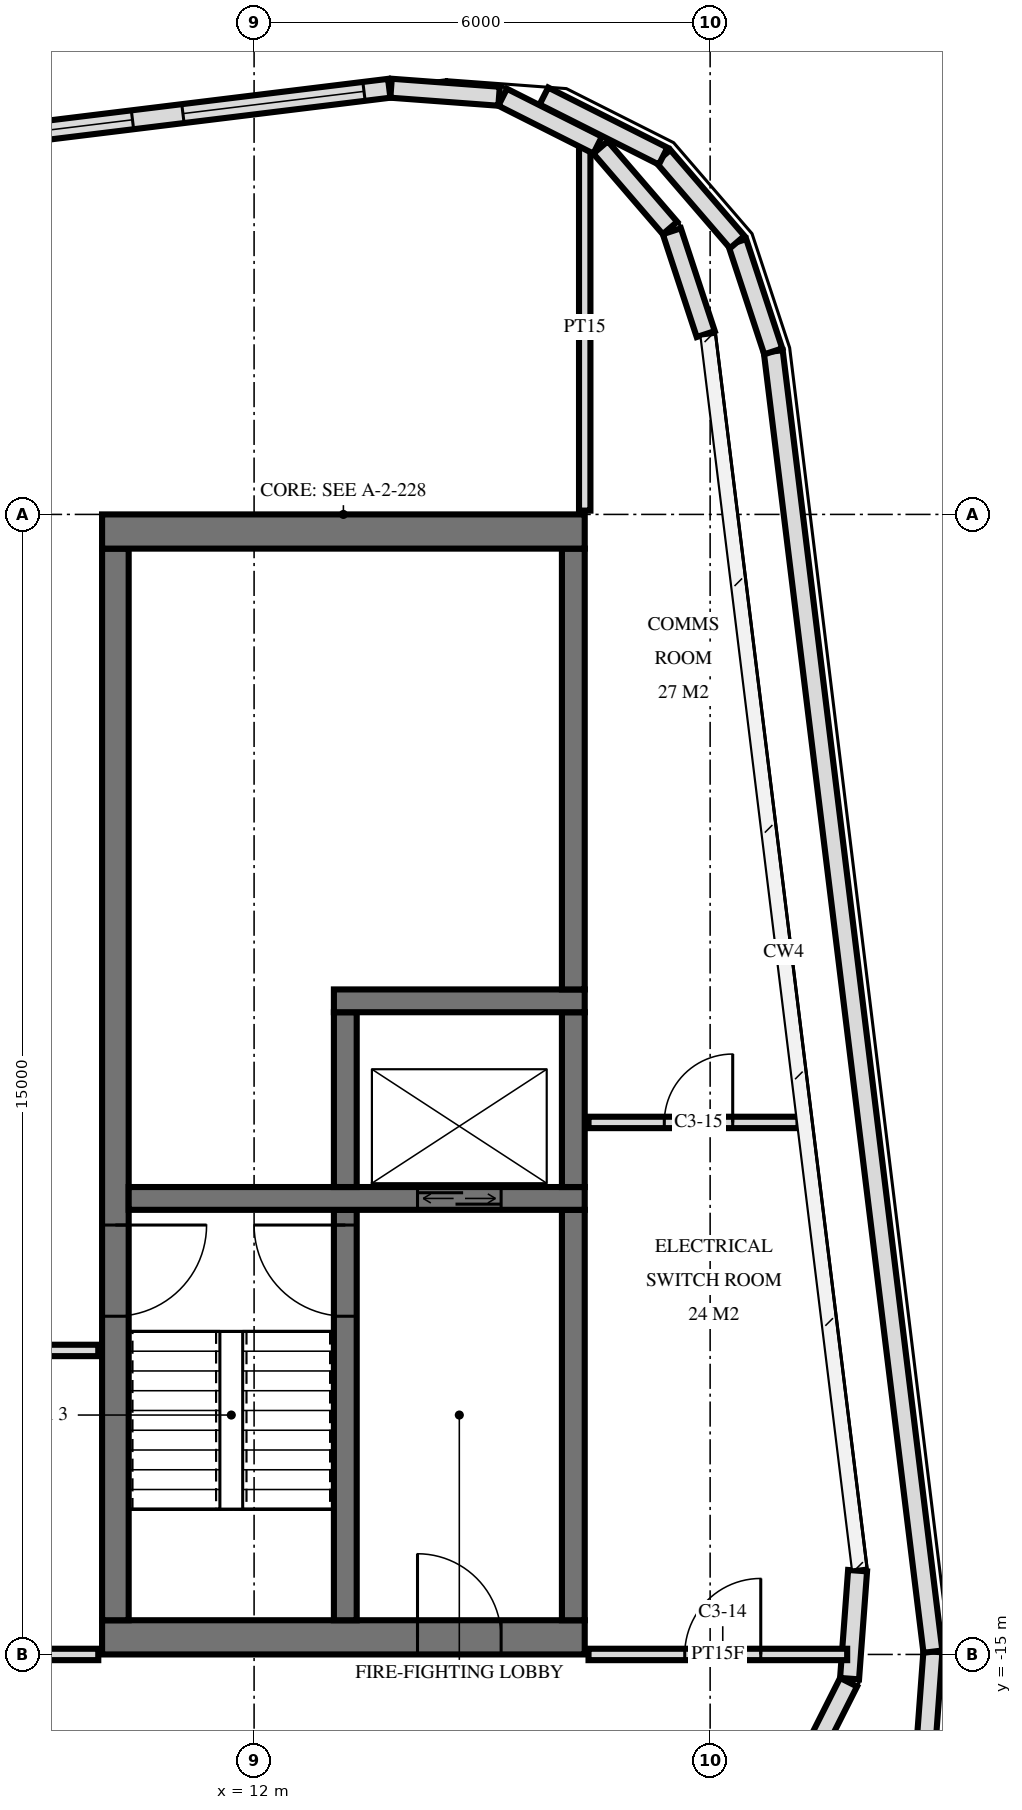
"""IFC4 building model, lengths in metres.
Left out: names, types, materials, properties, quantities, classifications, styles, units other than length and angle.
Written with IfcOpenShell. Run it as: python <this file> out.ifc"""

import sys

from ifc_helpers import new_model, si_unit, direction, frame, frame_2d, origin, place, context, subcontext, project, spatial, rectangle, extrude, element, fill, save


model = new_model("IFC4")
c1 = context("Model", 3, precision=1e-05, world=origin(), true_north=direction((0.0, 1.0)))
c2 = subcontext(c1, "Body", "Model", "MODEL_VIEW")
j1 = project(units=[si_unit("LENGTHUNIT", "METRE"), si_unit("PLANEANGLEUNIT", "RADIAN")], contexts=[c1])
p1 = place(None, origin())
s1 = spatial("IfcSite", under=j1, at=p1, CompositionType="ELEMENT")
p2 = place(p1, origin())
s2 = spatial("IfcBuilding", under=s1, at=p2, CompositionType="ELEMENT")
p3 = place(p2, frame((0.0, 0.0, 353.8)))
s3 = spatial("IfcBuildingStorey", under=s2, at=p3, CompositionType="ELEMENT", Elevation=353.8)
p4 = place(p3, frame((10.0, -0.225, 0.0), z_axis=(0.0, 0.0, 1.0), x_axis=(1.0, 0.0, 0.0)))
e1 = element("IfcWall", 1, at=p4, inside=s3, PredefinedType="SHEAR", context=c2, shape_type="SweptSolid", body=[
    extrude(rectangle(XDim=6.35, YDim=0.45, at=frame_2d((3.175, 0.0))), origin(), (0.0, 0.0, 1.0), 3.6),
])
p5 = place(p3, frame((10.0, -14.775, 0.0), z_axis=(0.0, 0.0, 1.0), x_axis=(1.0, 0.0, 0.0)))
e2 = element("IfcWall", 2, at=p5, inside=s3, PredefinedType="SHEAR", context=c2, shape_type="SweptSolid", body=[
    extrude(rectangle(XDim=6.35, YDim=0.45, at=frame_2d((3.175, 0.0))), origin(), (0.0, 0.0, 1.0), 3.6),
])
p6 = place(p5, frame((4.15, 0.0, 0.0)))
e3 = element("IfcOpeningElement", 3, at=p6, cuts=e2, PredefinedType="OPENING", context=c2, shape_type="SweptSolid", body=[
    extrude(rectangle(XDim=1.1, YDim=2.1, at=frame_2d((0.55, 1.05))), frame((0.0, 0.235, 0.0), z_axis=(0.0, -1.0, 0.0), x_axis=(1.0, 0.0, 0.0)), (0.0, 0.0, 1.0), 0.47),
])
p7 = place(p3, frame((10.175, -14.55, 0.0), z_axis=(0.0, 0.0, 1.0), x_axis=(0.0, 1.0, 0.0)))
e4 = element("IfcWall", 4, at=p7, inside=s3, PredefinedType="SHEAR", context=c2, shape_type="SweptSolid", body=[
    extrude(rectangle(XDim=14.1, YDim=0.35, at=frame_2d((7.05, 0.0))), origin(), (0.0, 0.0, 1.0), 3.6),
])
p8 = place(p7, frame((4.0, 0.0, 0.0)))
e5 = element("IfcOpeningElement", 5, at=p8, cuts=e4, PredefinedType="OPENING", context=c2, shape_type="SweptSolid", body=[
    extrude(rectangle(XDim=1.2, YDim=2.1, at=frame_2d((0.6, 1.05))), frame((0.0, 0.185, 0.0), z_axis=(0.0, -1.0, 0.0), x_axis=(1.0, 0.0, 0.0)), (0.0, 0.0, 1.0), 0.37),
])
p9 = place(p3, frame((16.2, -6.25, 0.0), z_axis=(0.0, 0.0, 1.0), x_axis=(0.0, 1.0, 0.0)))
e6 = element("IfcWall", 6, at=p9, inside=s3, PredefinedType="SHEAR", context=c2, shape_type="SweptSolid", body=[
    extrude(rectangle(XDim=5.8, YDim=0.3, at=frame_2d((2.9, 0.0))), origin(), (0.0, 0.0, 1.0), 3.6),
])
p10 = place(p3, frame((16.2, -14.55, 0.0), z_axis=(0.0, 0.0, 1.0), x_axis=(0.0, 1.0, 0.0)))
e7 = element("IfcWall", 7, at=p10, inside=s3, PredefinedType="SHEAR", context=c2, shape_type="SweptSolid", body=[
    extrude(rectangle(XDim=5.4, YDim=0.3, at=frame_2d((2.7, 0.0))), origin(), (0.0, 0.0, 1.0), 3.6),
])
p11 = place(p3, frame((10.35, -9.0, 0.0), z_axis=(0.0, 0.0, 1.0), x_axis=(1.0, 0.0, 0.0)))
e8 = element("IfcWall", 8, at=p11, inside=s3, PredefinedType="SHEAR", context=c2, shape_type="SweptSolid", body=[
    extrude(rectangle(XDim=6.0, YDim=0.3, at=frame_2d((3.0, 0.0))), origin(), (0.0, 0.0, 1.0), 3.6),
])
p12 = place(p11, frame((3.8, 0.0, 0.0)))
e9 = element("IfcOpeningElement", 9, at=p12, cuts=e8, PredefinedType="OPENING", context=c2, shape_type="SweptSolid", body=[
    extrude(rectangle(XDim=1.1, YDim=2.1, at=frame_2d((0.55, 1.05))), frame((0.0, 0.16, 0.0), z_axis=(0.0, -1.0, 0.0), x_axis=(1.0, 0.0, 0.0)), (0.0, 0.0, 1.0), 0.32),
])
p13 = place(p3, frame((13.2, -14.55, 0.0), z_axis=(0.0, 0.0, 1.0), x_axis=(0.0, 1.0, 0.0)))
e10 = element("IfcWall", 10, at=p13, inside=s3, PredefinedType="SHEAR", context=c2, shape_type="SweptSolid", body=[
    extrude(rectangle(XDim=5.4, YDim=0.3, at=frame_2d((2.7, 0.0))), origin(), (0.0, 0.0, 1.0), 3.6),
])
p14 = place(p13, frame((4.0, 0.0, 0.0)))
e11 = element("IfcOpeningElement", 11, at=p14, cuts=e10, PredefinedType="OPENING", context=c2, shape_type="SweptSolid", body=[
    extrude(rectangle(XDim=1.2, YDim=2.1, at=frame_2d((0.6, 1.05))), frame((0.0, 0.16, 0.0), z_axis=(0.0, -1.0, 0.0), x_axis=(1.0, 0.0, 0.0)), (0.0, 0.0, 1.0), 0.32),
])
p15 = place(p3, frame((13.05, -6.4, 0.0), z_axis=(0.0, 0.0, 1.0), x_axis=(1.0, 0.0, 0.0)))
e12 = element("IfcWall", 12, at=p15, inside=s3, PredefinedType="SHEAR", context=c2, shape_type="SweptSolid", body=[
    extrude(rectangle(XDim=3.3, YDim=0.3, at=frame_2d((1.65, 0.0))), origin(), (0.0, 0.0, 1.0), 3.6),
])
for number, where, z_axis, x_axis in (
    (13, (13.2, -8.85, 0.0), (0.0, 0.0, 1.0), (0.0, 1.0, 0.0)),
    (14, (16.2, -8.85, 0.0), (0.0, 0.0, 1.0), (0.0, 1.0, 0.0)),
):
    element("IfcWall", number, at=place(p3, frame(where, z_axis=z_axis, x_axis=x_axis)), inside=s3, PredefinedType="SHEAR", context=c2, shape_type="SweptSolid", body=[
        extrude(rectangle(XDim=2.3, YDim=0.3, at=frame_2d((1.15, 0.0))), origin(), (0.0, 0.0, 1.0), 3.6),
    ])
p16 = place(p3, frame((17.942, 2.373, 0.0), z_axis=(0.0, 0.0, 1.0), x_axis=(-0.313244554677, 0.949672495635, 0.0)))
e15 = element("IfcWall", 15, at=p16, inside=s3, PredefinedType="SOLIDWALL", context=c2, shape_type="SweptSolid", body=[
    extrude(rectangle(XDim=1.425, YDim=0.25, at=frame_2d((0.712, 0.0))), origin(), (0.0, 0.0, 1.0), 3.32),
])
p17 = place(p3, frame((17.472, 3.769, 0.0), z_axis=(0.0, 0.0, 1.0), x_axis=(-0.652742912325, 0.757579494449, 0.0)))
e16 = element("IfcWall", 16, at=p17, inside=s3, PredefinedType="SOLIDWALL", context=c2, shape_type="SweptSolid", body=[
    extrude(rectangle(XDim=1.4, YDim=0.25, at=frame_2d((0.7, 0.0))), origin(), (0.0, 0.0, 1.0), 3.32),
])
p18 = place(p3, frame((16.52, 4.859, 0.0), z_axis=(0.0, 0.0, 1.0), x_axis=(-0.892957383621, 0.450141212329, 0.0)))
e17 = element("IfcWall", 17, at=p18, inside=s3, PredefinedType="SOLIDWALL", context=c2, shape_type="SweptSolid", body=[
    extrude(rectangle(XDim=1.4, YDim=0.25, at=frame_2d((0.7, 0.0))), origin(), (0.0, 0.0, 1.0), 3.32),
])
p19 = place(p3, frame((15.223, 5.502, 0.0), z_axis=(0.0, 0.0, 1.0), x_axis=(-0.997256522221, 0.074023164536, 0.0)))
e18 = element("IfcWall", 18, at=p19, inside=s3, PredefinedType="SOLIDWALL", context=c2, shape_type="SweptSolid", body=[
    extrude(rectangle(XDim=1.425, YDim=0.25, at=frame_2d((0.712, 0.0))), origin(), (0.0, 0.0, 1.0), 3.32),
])
p20 = place(p3, frame((13.778, 5.607, 0.0), z_axis=(0.0, 0.0, 1.0), x_axis=(-0.992546967066, -0.121862702117, 0.0)))
e19 = element("IfcWall", 19, at=p20, inside=s3, PredefinedType="SOLIDWALL", context=c2, shape_type="SweptSolid", body=[
    extrude(rectangle(XDim=30.688, YDim=0.25, at=frame_2d((15.344, 0.0))), origin(), (0.0, 0.0, 1.0), 3.32),
])
p21 = place(p20, frame((0.334, 0.0, 0.498)))
e20 = element("IfcOpeningElement", 20, at=p21, cuts=e19, PredefinedType="OPENING", context=c2, shape_type="SweptSolid", body=[
    extrude(rectangle(XDim=2.4, YDim=2.622, at=frame_2d((1.2, 1.311))), frame((0.0, 0.135, 0.0), z_axis=(0.0, -1.0, 0.0), x_axis=(1.0, 0.0, 0.0)), (0.0, 0.0, 1.0), 0.27),
])
p22 = place(p20, frame((3.403, 0.0, 0.498)))
e21 = element("IfcOpeningElement", 21, at=p22, cuts=e19, PredefinedType="OPENING", context=c2, shape_type="SweptSolid", body=[
    extrude(rectangle(XDim=2.4, YDim=2.622, at=frame_2d((1.2, 1.311))), frame((0.0, 0.135, 0.0), z_axis=(0.0, -1.0, 0.0), x_axis=(1.0, 0.0, 0.0)), (0.0, 0.0, 1.0), 0.27),
])
p23 = place(p20, frame((6.472, 0.0, 0.498)))
e22 = element("IfcOpeningElement", 22, at=p23, cuts=e19, PredefinedType="OPENING", context=c2, shape_type="SweptSolid", body=[
    extrude(rectangle(XDim=2.4, YDim=2.622, at=frame_2d((1.2, 1.311))), frame((0.0, 0.135, 0.0), z_axis=(0.0, -1.0, 0.0), x_axis=(1.0, 0.0, 0.0)), (0.0, 0.0, 1.0), 0.27),
])
p24 = place(p20, frame((9.541, 0.0, 0.498)))
e23 = element("IfcOpeningElement", 23, at=p24, cuts=e19, PredefinedType="OPENING", context=c2, shape_type="SweptSolid", body=[
    extrude(rectangle(XDim=2.4, YDim=2.622, at=frame_2d((1.2, 1.311))), frame((0.0, 0.135, 0.0), z_axis=(0.0, -1.0, 0.0), x_axis=(1.0, 0.0, 0.0)), (0.0, 0.0, 1.0), 0.27),
])
p25 = place(p20, frame((12.61, 0.0, 0.498)))
e24 = element("IfcOpeningElement", 24, at=p25, cuts=e19, PredefinedType="OPENING", context=c2, shape_type="SweptSolid", body=[
    extrude(rectangle(XDim=2.4, YDim=2.622, at=frame_2d((1.2, 1.311))), frame((0.0, 0.135, 0.0), z_axis=(0.0, -1.0, 0.0), x_axis=(1.0, 0.0, 0.0)), (0.0, 0.0, 1.0), 0.27),
])
p26 = place(p20, frame((15.678, 0.0, 0.498)))
e25 = element("IfcOpeningElement", 25, at=p26, cuts=e19, PredefinedType="OPENING", context=c2, shape_type="SweptSolid", body=[
    extrude(rectangle(XDim=2.4, YDim=2.622, at=frame_2d((1.2, 1.311))), frame((0.0, 0.135, 0.0), z_axis=(0.0, -1.0, 0.0), x_axis=(1.0, 0.0, 0.0)), (0.0, 0.0, 1.0), 0.27),
])
p27 = place(p20, frame((18.747, 0.0, 0.498)))
e26 = element("IfcOpeningElement", 26, at=p27, cuts=e19, PredefinedType="OPENING", context=c2, shape_type="SweptSolid", body=[
    extrude(rectangle(XDim=2.4, YDim=2.622, at=frame_2d((1.2, 1.311))), frame((0.0, 0.135, 0.0), z_axis=(0.0, -1.0, 0.0), x_axis=(1.0, 0.0, 0.0)), (0.0, 0.0, 1.0), 0.27),
])
p28 = place(p20, frame((21.816, 0.0, 0.498)))
e27 = element("IfcOpeningElement", 27, at=p28, cuts=e19, PredefinedType="OPENING", context=c2, shape_type="SweptSolid", body=[
    extrude(rectangle(XDim=2.4, YDim=2.622, at=frame_2d((1.2, 1.311))), frame((0.0, 0.135, 0.0), z_axis=(0.0, -1.0, 0.0), x_axis=(1.0, 0.0, 0.0)), (0.0, 0.0, 1.0), 0.27),
])
p29 = place(p20, frame((24.885, 0.0, 0.498)))
e28 = element("IfcOpeningElement", 28, at=p29, cuts=e19, PredefinedType="OPENING", context=c2, shape_type="SweptSolid", body=[
    extrude(rectangle(XDim=2.4, YDim=2.622, at=frame_2d((1.2, 1.311))), frame((0.0, 0.135, 0.0), z_axis=(0.0, -1.0, 0.0), x_axis=(1.0, 0.0, 0.0)), (0.0, 0.0, 1.0), 0.27),
])
p30 = place(p20, frame((27.954, 0.0, 0.498)))
e29 = element("IfcOpeningElement", 29, at=p30, cuts=e19, PredefinedType="OPENING", context=c2, shape_type="SweptSolid", body=[
    extrude(rectangle(XDim=2.4, YDim=2.622, at=frame_2d((1.2, 1.311))), frame((0.0, 0.135, 0.0), z_axis=(0.0, -1.0, 0.0), x_axis=(1.0, 0.0, 0.0)), (0.0, 0.0, 1.0), 0.27),
])
p31 = place(p3, frame((19.191, -16.615, 0.0), z_axis=(0.0, 0.0, 1.0), x_axis=(0.450072232014, 0.892992153364, 0.0)))
e30 = element("IfcWall", 30, at=p31, inside=s3, PredefinedType="SOLIDWALL", context=c2, shape_type="SweptSolid", body=[
    extrude(rectangle(XDim=1.399, YDim=0.25, at=frame_2d((0.7, 0.0))), origin(), (0.0, 0.0, 1.0), 3.32),
])
p32 = place(p3, frame((19.834, -15.318, 0.0), z_axis=(0.0, 0.0, 1.0), x_axis=(0.074035815757, 0.99725558308, 0.0)))
e31 = element("IfcWall", 31, at=p32, inside=s3, PredefinedType="SOLIDWALL", context=c2, shape_type="SweptSolid", body=[
    extrude(rectangle(XDim=1.425, YDim=0.25, at=frame_2d((0.712, 0.0))), origin(), (0.0, 0.0, 1.0), 3.32),
])
p33 = place(p3, frame((15.813, 5.505, 0.0), z_axis=(0.0, 0.0, 1.0), x_axis=(0.89297685158, -0.45010259113, 0.0)))
e32 = element("IfcWall", 32, at=p33, inside=s3, PredefinedType="PARAPET", context=c2, shape_type="SweptSolid", body=[
    extrude(rectangle(XDim=1.756, YDim=0.25, at=frame_2d((0.878, 0.0))), origin(), (0.0, 0.0, 1.0), 1.1),
])
p34 = place(p3, frame((17.382, 4.715, 0.0), z_axis=(0.0, 0.0, 1.0), x_axis=(0.652742242304, -0.757580071749, 0.0)))
e33 = element("IfcWall", 33, at=p34, inside=s3, PredefinedType="PARAPET", context=c2, shape_type="SweptSolid", body=[
    extrude(rectangle(XDim=1.493, YDim=0.25, at=frame_2d((0.746, 0.0))), origin(), (0.0, 0.0, 1.0), 1.1),
])
p35 = place(p3, frame((18.356, 3.584, 0.0), z_axis=(0.0, 0.0, 1.0), x_axis=(0.313131832198, -0.949709669143, 0.0)))
e34 = element("IfcWall", 34, at=p35, inside=s3, PredefinedType="PARAPET", context=c2, shape_type="SweptSolid", body=[
    extrude(rectangle(XDim=1.515, YDim=0.25, at=frame_2d((0.757, 0.0))), origin(), (0.0, 0.0, 1.0), 1.1),
])
p36 = place(p3, frame((18.83, 2.145, 0.0), z_axis=(0.0, 0.0, 1.0), x_axis=(0.121867555864, -0.992546371122, 0.0)))
e35 = element("IfcWall", 35, at=p36, inside=s3, PredefinedType="PARAPET", context=c2, shape_type="SweptSolid", body=[
    extrude(rectangle(XDim=17.237, YDim=0.25, at=frame_2d((8.618, 0.0))), origin(), (0.0, 0.0, 1.0), 1.1),
])
p37 = place(p3, frame((20.931, -14.963, 0.0), z_axis=(0.0, 0.0, 1.0), x_axis=(-0.074132878365, -0.997248372446, 0.0)))
e36 = element("IfcWall", 36, at=p37, inside=s3, PredefinedType="PARAPET", context=c2, shape_type="SweptSolid", body=[
    extrude(rectangle(XDim=1.515, YDim=0.25, at=frame_2d((0.757, 0.0))), origin(), (0.0, 0.0, 1.0), 1.1),
])
p38 = place(p3, frame((16.35, 0.05, 0.0), z_axis=(0.0, 0.0, 1.0), x_axis=(0.0, 1.0, 0.0)))
e37 = element("IfcWall", 37, at=p38, inside=s3, PredefinedType="PARTITIONING", context=c2, shape_type="SweptSolid", body=[
    extrude(rectangle(XDim=4.833, YDim=0.15, at=frame_2d((2.417, 0.0))), origin(), (0.0, 0.0, 1.0), 3.32),
])
p39 = place(p3, frame((-9.95, -15.0, 0.0), z_axis=(0.0, 0.0, 1.0), x_axis=(1.0, 0.0, 0.0)))
e38 = element("IfcWall", 38, at=p39, inside=s3, PredefinedType="PARTITIONING", context=c2, shape_type="SweptSolid", body=[
    extrude(rectangle(XDim=19.9, YDim=0.15, at=frame_2d((9.95, 0.0))), origin(), (0.0, 0.0, 1.0), 2.684),
])
p40 = place(p39, frame((9.43, 0.0, 0.0)))
e39 = element("IfcOpeningElement", 39, at=p40, cuts=e38, PredefinedType="OPENING", context=c2, shape_type="SweptSolid", body=[
    extrude(rectangle(XDim=1.0, YDim=2.1, at=frame_2d((0.5, 1.05))), frame((0.0, 0.085, 0.0), z_axis=(0.0, -1.0, 0.0), x_axis=(1.0, 0.0, 0.0)), (0.0, 0.0, 1.0), 0.17),
])
p41 = place(p3, frame((16.4, -15.0, 0.0), z_axis=(0.0, 0.0, 1.0), x_axis=(1.0, 0.0, 0.0)))
e40 = element("IfcWall", 40, at=p41, inside=s3, PredefinedType="PARTITIONING", context=c2, shape_type="SweptSolid", body=[
    extrude(rectangle(XDim=3.403, YDim=0.15, at=frame_2d((1.702, 0.0))), origin(), (0.0, 0.0, 1.0), 3.32),
])
p42 = place(p41, frame((1.266, 0.0, 0.0)))
e41 = element("IfcOpeningElement", 41, at=p42, cuts=e40, PredefinedType="OPENING", context=c2, shape_type="SweptSolid", body=[
    extrude(rectangle(XDim=1.0, YDim=2.1, at=frame_2d((0.5, 1.05))), frame((0.0, 0.085, 0.0), z_axis=(0.0, -1.0, 0.0), x_axis=(1.0, 0.0, 0.0)), (0.0, 0.0, 1.0), 0.17),
])
p43 = place(p3, frame((-9.95, -11.0, 0.0), z_axis=(0.0, 0.0, 1.0), x_axis=(1.0, 0.0, 0.0)))
e42 = element("IfcWall", 42, at=p43, inside=s3, PredefinedType="PARTITIONING", context=c2, shape_type="SweptSolid", body=[
    extrude(rectangle(XDim=19.9, YDim=0.15, at=frame_2d((9.95, 0.0))), origin(), (0.0, 0.0, 1.0), 3.32),
])
p44 = place(p3, frame((16.4, -8.0, 0.0), z_axis=(0.0, 0.0, 1.0), x_axis=(1.0, 0.0, 0.0)))
e43 = element("IfcWall", 43, at=p44, inside=s3, PredefinedType="PARTITIONING", context=c2, shape_type="SweptSolid", body=[
    extrude(rectangle(XDim=2.763, YDim=0.15, at=frame_2d((1.381, 0.0))), origin(), (0.0, 0.0, 1.0), 3.32),
])
p45 = place(p44, frame((0.997, 0.0, 0.0)))
e44 = element("IfcOpeningElement", 44, at=p45, cuts=e43, PredefinedType="OPENING", context=c2, shape_type="SweptSolid", body=[
    extrude(rectangle(XDim=0.9, YDim=2.1, at=frame_2d((0.45, 1.05))), frame((0.0, 0.085, 0.0), z_axis=(0.0, -1.0, 0.0), x_axis=(1.0, 0.0, 0.0)), (0.0, 0.0, 1.0), 0.17),
])
p46 = place(p21, origin())
e45 = element("IfcWindow", 45, at=p46, inside=s3, PartitioningType="SINGLE_PANEL", PredefinedType="USERDEFINED", context=c2, shape_type="SweptSolid", body=[
    extrude(rectangle(XDim=2.4, YDim=2.622, at=frame_2d((1.2, 1.311))), frame((0.0, 0.03, 0.0), z_axis=(0.0, -1.0, 0.0), x_axis=(1.0, 0.0, 0.0)), (0.0, 0.0, 1.0), 0.06),
])
fill(e20, e45)
p47 = place(p22, origin())
e46 = element("IfcWindow", 46, at=p47, inside=s3, PartitioningType="SINGLE_PANEL", PredefinedType="USERDEFINED", context=c2, shape_type="SweptSolid", body=[
    extrude(rectangle(XDim=2.4, YDim=2.622, at=frame_2d((1.2, 1.311))), frame((0.0, 0.03, 0.0), z_axis=(0.0, -1.0, 0.0), x_axis=(1.0, 0.0, 0.0)), (0.0, 0.0, 1.0), 0.06),
])
fill(e21, e46)
p48 = place(p12, origin())
e47 = element("IfcDoor", 47, at=p48, inside=s3, OperationType="DOUBLE_DOOR_SLIDING", PredefinedType="USERDEFINED", context=c2, shape_type="SweptSolid", body=[
    extrude(rectangle(XDim=1.1, YDim=2.1, at=frame_2d((0.55, 1.05))), frame((0.0, 0.025, 0.0), z_axis=(0.0, -1.0, 0.0), x_axis=(1.0, 0.0, 0.0)), (0.0, 0.0, 1.0), 0.05),
])
fill(e9, e47)
p49 = place(p8, frame((0.6, 0.0, 0.0), z_axis=(0.0, 0.0, 1.0), x_axis=(-1.0, 0.0, 0.0)))
e48 = element("IfcDoor", 48, at=p49, inside=s3, OperationType="SINGLE_SWING_RIGHT", PredefinedType="DOOR", context=c2, shape_type="SweptSolid", body=[
    extrude(rectangle(XDim=1.2, YDim=2.1, at=frame_2d((0.0, 1.05))), frame((0.0, -0.025, 0.0), z_axis=(0.0, 1.0, 0.0), x_axis=(-1.0, 0.0, 0.0)), (0.0, 0.0, 1.0), 0.05),
])
fill(e5, e48)
p50 = place(p6, origin())
e49 = element("IfcDoor", 49, at=p50, inside=s3, OperationType="SINGLE_SWING_RIGHT", PredefinedType="DOOR", context=c2, shape_type="SweptSolid", body=[
    extrude(rectangle(XDim=1.1, YDim=2.1, at=frame_2d((0.55, 1.05))), frame((0.0, 0.025, 0.0), z_axis=(0.0, -1.0, 0.0), x_axis=(1.0, 0.0, 0.0)), (0.0, 0.0, 1.0), 0.05),
])
fill(e3, e49)
p51 = place(p14, origin())
e50 = element("IfcDoor", 50, at=p51, inside=s3, OperationType="SINGLE_SWING_LEFT", PredefinedType="DOOR", context=c2, shape_type="SweptSolid", body=[
    extrude(rectangle(XDim=1.2, YDim=2.1, at=frame_2d((0.6, 1.05))), frame((0.0, 0.025, 0.0), z_axis=(0.0, -1.0, 0.0), x_axis=(1.0, 0.0, 0.0)), (0.0, 0.0, 1.0), 0.05),
])
fill(e11, e50)
p52 = place(p42, origin())
e51 = element("IfcDoor", 51, at=p52, inside=s3, OperationType="SINGLE_SWING_LEFT", PredefinedType="DOOR", context=c2, shape_type="SweptSolid", body=[
    extrude(rectangle(XDim=1.0, YDim=2.1, at=frame_2d((0.5, 1.05))), frame((0.0, 0.025, 0.0), z_axis=(0.0, -1.0, 0.0), x_axis=(1.0, 0.0, 0.0)), (0.0, 0.0, 1.0), 0.05),
])
fill(e41, e51)
p53 = place(p45, origin())
e52 = element("IfcDoor", 52, at=p53, inside=s3, OperationType="SINGLE_SWING_LEFT", PredefinedType="DOOR", context=c2, shape_type="SweptSolid", body=[
    extrude(rectangle(XDim=0.9, YDim=2.1, at=frame_2d((0.45, 1.05))), frame((0.0, 0.025, 0.0), z_axis=(0.0, -1.0, 0.0), x_axis=(1.0, 0.0, 0.0)), (0.0, 0.0, 1.0), 0.05),
])
fill(e44, e52)
save(model, sys.argv[1])
